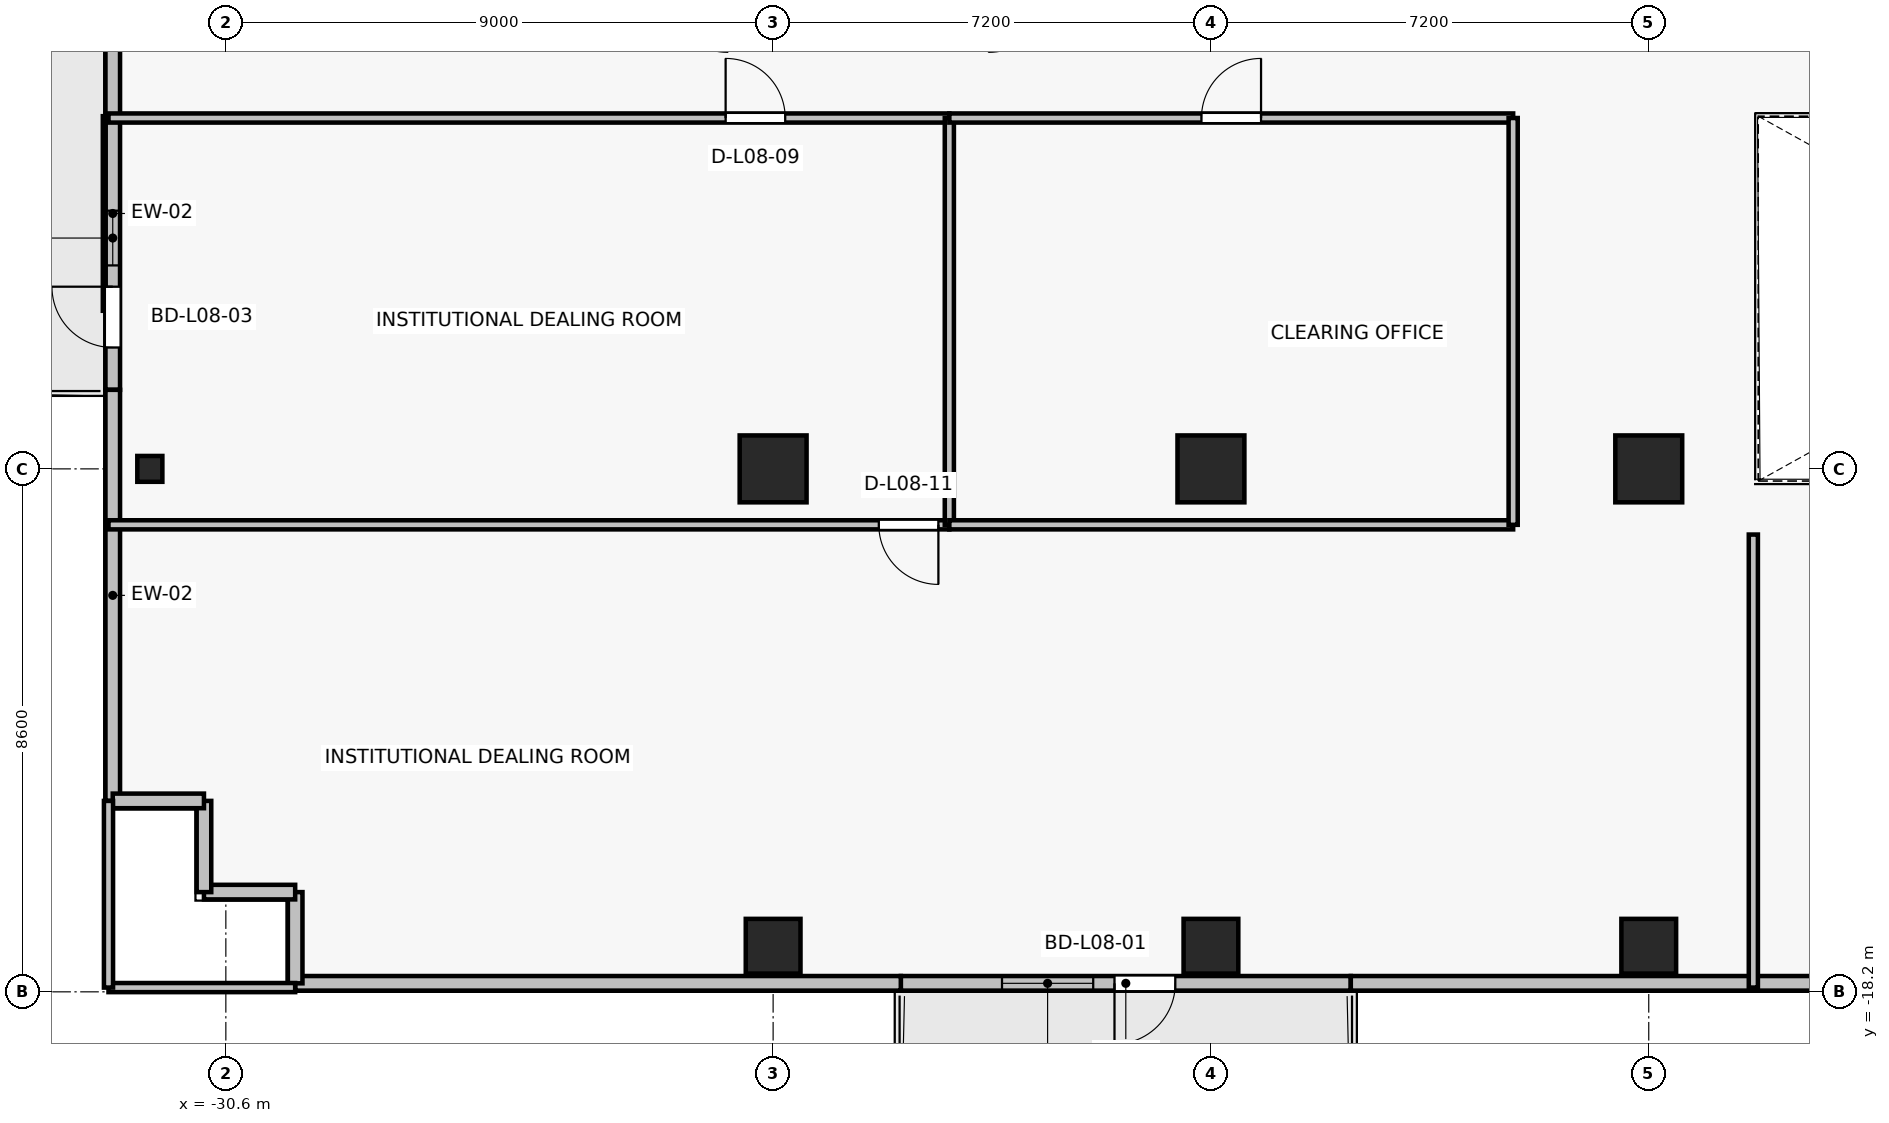
"""IFC4 building model, lengths in metres.
Left out: names, types, materials, properties, quantities, classifications, styles, units other than length and angle.
Written with IfcOpenShell. Run it as: python <this file> out.ifc"""

import sys

from ifc_helpers import new_model, si_unit, direction, frame, frame_2d, origin, origin_2d, place, context, subcontext, project, spatial, rectangle, i_section, extrude, source, transform, mapped, element, fill, save


model = new_model("IFC4")
c1 = context("Model", 3, precision=1e-05, world=origin(), true_north=direction((0.0, 1.0)))
c2 = subcontext(c1, "Body", "Model", "MODEL_VIEW")
j1 = project(units=[si_unit("LENGTHUNIT", "METRE"), si_unit("PLANEANGLEUNIT", "RADIAN")], contexts=[c1])
p1 = place(None, origin())
s1 = spatial("IfcSite", under=j1, at=p1, CompositionType="ELEMENT")
p2 = place(p1, origin())
s2 = spatial("IfcBuilding", under=s1, at=p2, CompositionType="ELEMENT")
p3 = place(p2, frame((0.0, 0.0, 34.0)))
s3 = spatial("IfcBuildingStorey", under=s2, at=p3, CompositionType="ELEMENT", Elevation=34.0)
for number, where, z_axis, x_axis in (
    (1, (-14.4, -9.6, 0.0), (0.0, 0.0, 1.0), (1.0, 0.0, 0.0)),
    (2, (-7.2, -9.6, 0.0), (0.0, 0.0, 1.0), (1.0, 0.0, 0.0)),
    (3, (-21.6, -9.6, 0.0), (0.0, 0.0, 1.0), (1.0, 0.0, 0.0)),
):
    element("IfcColumn", number, at=place(p3, frame(where, z_axis=z_axis, x_axis=x_axis)), inside=s3, PredefinedType="COLUMN", context=c2, shape_type="SweptSolid", body=[
        extrude(rectangle(XDim=1.1, YDim=1.1, at=origin_2d()), origin(), (0.0, 0.0, 1.0), 3.3),
    ])
for number, where, z_axis, x_axis in (
    (4, (-14.4, -17.45, 0.0), (0.0, 0.0, 1.0), (1.0, 0.0, 0.0)),
    (5, (-7.2, -17.45, 0.0), (0.0, 0.0, 1.0), (1.0, 0.0, 0.0)),
    (6, (-21.6, -17.45, 0.0), (0.0, 0.0, 1.0), (1.0, 0.0, 0.0)),
):
    element("IfcColumn", number, at=place(p3, frame(where, z_axis=z_axis, x_axis=x_axis)), inside=s3, PredefinedType="COLUMN", context=c2, shape_type="SweptSolid", body=[
        extrude(rectangle(XDim=0.9, YDim=0.9, at=origin_2d()), origin(), (0.0, 0.0, 1.0), 3.3),
    ])
p4 = place(p3, frame((-31.85, -9.6, 0.0), z_axis=(0.0, 0.0, 1.0), x_axis=(1.0, 0.0, 0.0)))
e7 = element("IfcColumn", 7, at=p4, inside=s3, PredefinedType="COLUMN", context=c2, shape_type="SweptSolid", body=[
    extrude(i_section(OverallWidth=0.412, OverallDepth=0.425, WebThickness=0.026, FlangeThickness=0.039, FilletRadius=0.015, at=origin_2d()), origin(), (0.0, 0.0, 1.0), 3.3),
])
p5 = place(p3, frame((-12.1, -18.06, 0.0), z_axis=(0.0, 0.0, 1.0), x_axis=(-1.0, 0.0, 0.0)))
e8 = element("IfcWall", 8, at=p5, inside=s3, PredefinedType="SOLIDWALL", context=c2, shape_type="SweptSolid", body=[
    extrude(rectangle(XDim=7.4, YDim=0.24, at=frame_2d((3.7, 0.0))), origin(), (0.0, 0.0, 1.0), 2.665),
])
p6 = place(p5, frame((2.886, 0.0, 0.0)))
e9 = element("IfcOpeningElement", 9, at=p6, cuts=e8, PredefinedType="OPENING", context=c2, shape_type="SweptSolid", body=[
    extrude(rectangle(XDim=1.0, YDim=2.2, at=frame_2d((0.5, 1.1))), frame((0.0, 0.13, 0.0), z_axis=(0.0, -1.0, 0.0), x_axis=(1.0, 0.0, 0.0)), (0.0, 0.0, 1.0), 0.26),
])
p7 = place(p5, frame((4.236, 0.0, 0.85)))
e10 = element("IfcOpeningElement", 10, at=p7, cuts=e8, PredefinedType="OPENING", context=c2, shape_type="SweptSolid", body=[
    extrude(rectangle(XDim=1.5, YDim=1.6, at=frame_2d((0.75, 0.8))), frame((0.0, 0.13, 0.0), z_axis=(0.0, -1.0, 0.0), x_axis=(1.0, 0.0, 0.0)), (0.0, 0.0, 1.0), 0.26),
])
p8 = place(p3, frame((-32.46, -8.3, 0.0), z_axis=(0.0, 0.0, 1.0), x_axis=(0.0, 1.0, 0.0)))
e11 = element("IfcWall", 11, at=p8, inside=s3, PredefinedType="SOLIDWALL", context=c2, shape_type="SweptSolid", body=[
    extrude(rectangle(XDim=5.8, YDim=0.24, at=frame_2d((2.9, 0.0))), origin(), (0.0, 0.0, 1.0), 3.075),
])
p9 = place(p8, frame((0.696, 0.0, 0.0)))
e12 = element("IfcOpeningElement", 12, at=p9, cuts=e11, PredefinedType="OPENING", context=c2, shape_type="SweptSolid", body=[
    extrude(rectangle(XDim=1.0, YDim=2.2, at=frame_2d((0.5, 1.1))), frame((0.0, 0.13, 0.0), z_axis=(0.0, -1.0, 0.0), x_axis=(1.0, 0.0, 0.0)), (0.0, 0.0, 1.0), 0.26),
])
p10 = place(p8, frame((2.046, 0.0, 0.85)))
e13 = element("IfcOpeningElement", 13, at=p10, cuts=e11, PredefinedType="OPENING", context=c2, shape_type="SweptSolid", body=[
    extrude(rectangle(XDim=0.9, YDim=1.35, at=frame_2d((0.45, 0.675))), frame((0.0, 0.13, 0.0), z_axis=(0.0, -1.0, 0.0), x_axis=(1.0, 0.0, 0.0)), (0.0, 0.0, 1.0), 0.26),
])
p11 = place(p3, frame((-32.46, -8.3, 0.0), z_axis=(0.0, 0.0, 1.0), x_axis=(0.0, -1.0, 0.0)))
e14 = element("IfcWall", 14, at=p11, inside=s3, PredefinedType="SOLIDWALL", context=c2, shape_type="SweptSolid", body=[
    extrude(rectangle(XDim=6.76, YDim=0.24, at=frame_2d((3.38, 0.0))), origin(), (0.0, 0.0, 1.0), 3.075),
])
p12 = place(p3, frame((-12.1, -18.06, 0.0), z_axis=(0.0, 0.0, 1.0), x_axis=(1.0, 0.0, 0.0)))
e15 = element("IfcWall", 15, at=p12, inside=s3, PredefinedType="SOLIDWALL", context=c2, shape_type="SweptSolid", body=[
    extrude(rectangle(XDim=8.76, YDim=0.24, at=frame_2d((4.38, 0.0))), origin(), (0.0, 0.0, 1.0), 3.075),
])
p13 = place(p3, frame((-29.46, -18.06, 0.0), z_axis=(0.0, 0.0, 1.0), x_axis=(1.0, 0.0, 0.0)))
e16 = element("IfcWall", 16, at=p13, inside=s3, PredefinedType="SOLIDWALL", context=c2, shape_type="SweptSolid", body=[
    extrude(rectangle(XDim=9.96, YDim=0.24, at=frame_2d((4.98, 0.0))), origin(), (0.0, 0.0, 1.0), 2.665),
])
for number, where, z_axis, x_axis in (
    (17, (-29.46, -16.56, 0.0), (0.0, 0.0, 1.0), (0.0, -1.0, 0.0)),
    (18, (-30.96, -16.56, 0.0), (0.0, 0.0, 1.0), (1.0, 0.0, 0.0)),
    (19, (-30.96, -15.06, 0.0), (0.0, 0.0, 1.0), (0.0, -1.0, 0.0)),
    (20, (-32.46, -15.06, 0.0), (0.0, 0.0, 1.0), (1.0, 0.0, 0.0)),
):
    element("IfcWall", number, at=place(p3, frame(where, z_axis=z_axis, x_axis=x_axis)), inside=s3, PredefinedType="SOLIDWALL", context=c2, shape_type="SweptSolid", body=[
        extrude(rectangle(XDim=1.5, YDim=0.24, at=frame_2d((0.75, 0.0))), origin(), (0.0, 0.0, 1.0), 3.075),
    ])
p14 = place(p3, frame((-18.702, -10.52, 0.0), z_axis=(0.0, 0.0, 1.0), x_axis=(-1.0, 0.0, 0.0)))
e21 = element("IfcWall", 21, at=p14, inside=s3, PredefinedType="PARTITIONING", context=c2, shape_type="SweptSolid", body=[
    extrude(rectangle(XDim=13.828, YDim=0.15, at=frame_2d((6.914, 0.0))), origin(), (0.0, 0.0, 1.0), 2.465),
])
p15 = place(p14, frame((0.18, 0.0, 0.0)))
e22 = element("IfcOpeningElement", 22, at=p15, cuts=e21, PredefinedType="OPENING", context=c2, shape_type="SweptSolid", body=[
    extrude(rectangle(XDim=0.98, YDim=2.15, at=frame_2d((0.49, 1.075))), frame((0.0, 0.085, 0.0), z_axis=(0.0, -1.0, 0.0), x_axis=(1.0, 0.0, 0.0)), (0.0, 0.0, 1.0), 0.17),
])
p16 = place(p3, frame((-32.53, -3.83, 0.0), z_axis=(0.0, 0.0, 1.0), x_axis=(1.0, 0.0, 0.0)))
e23 = element("IfcWall", 23, at=p16, inside=s3, PredefinedType="PARTITIONING", context=c2, shape_type="SweptSolid", body=[
    extrude(rectangle(XDim=13.828, YDim=0.15, at=frame_2d((6.914, 0.0))), origin(), (0.0, 0.0, 1.0), 2.465),
])
p17 = place(p16, frame((10.149, 0.0, 0.0)))
e24 = element("IfcOpeningElement", 24, at=p17, cuts=e23, PredefinedType="OPENING", context=c2, shape_type="SweptSolid", body=[
    extrude(rectangle(XDim=0.98, YDim=2.15, at=frame_2d((0.49, 1.075))), frame((0.0, 0.085, 0.0), z_axis=(0.0, -1.0, 0.0), x_axis=(1.0, 0.0, 0.0)), (0.0, 0.0, 1.0), 0.17),
])
p18 = place(p3, frame((-18.702, -3.83, 0.0), z_axis=(0.0, 0.0, 1.0), x_axis=(0.0, -1.0, 0.0)))
e25 = element("IfcWall", 25, at=p18, inside=s3, PredefinedType="PARTITIONING", context=c2, shape_type="SweptSolid", body=[
    extrude(rectangle(XDim=6.69, YDim=0.15, at=frame_2d((3.345, 0.0))), origin(), (0.0, 0.0, 1.0), 2.465),
])
p19 = place(p3, frame((-9.43, -10.52, 0.0), z_axis=(0.0, 0.0, 1.0), x_axis=(-1.0, 0.0, 0.0)))
e26 = element("IfcWall", 26, at=p19, inside=s3, PredefinedType="PARTITIONING", context=c2, shape_type="SweptSolid", body=[
    extrude(rectangle(XDim=9.272, YDim=0.15, at=frame_2d((4.636, 0.0))), origin(), (0.0, 0.0, 1.0), 2.465),
])
p20 = place(p3, frame((-18.702, -3.83, 0.0), z_axis=(0.0, 0.0, 1.0), x_axis=(1.0, 0.0, 0.0)))
e27 = element("IfcWall", 27, at=p20, inside=s3, PredefinedType="PARTITIONING", context=c2, shape_type="SweptSolid", body=[
    extrude(rectangle(XDim=9.272, YDim=0.15, at=frame_2d((4.636, 0.0))), origin(), (0.0, 0.0, 1.0), 2.465),
])
p21 = place(p20, frame((4.146, 0.0, 0.0)))
e28 = element("IfcOpeningElement", 28, at=p21, cuts=e27, PredefinedType="OPENING", context=c2, shape_type="SweptSolid", body=[
    extrude(rectangle(XDim=0.98, YDim=2.15, at=frame_2d((0.49, 1.075))), frame((0.0, 0.085, 0.0), z_axis=(0.0, -1.0, 0.0), x_axis=(1.0, 0.0, 0.0)), (0.0, 0.0, 1.0), 0.17),
])
p22 = place(p3, frame((-9.43, -3.83, 0.0), z_axis=(0.0, 0.0, 1.0), x_axis=(0.0, -1.0, 0.0)))
e29 = element("IfcWall", 29, at=p22, inside=s3, PredefinedType="PARTITIONING", context=c2, shape_type="SweptSolid", body=[
    extrude(rectangle(XDim=6.69, YDim=0.15, at=frame_2d((3.345, 0.0))), origin(), (0.0, 0.0, 1.0), 2.465),
])
p23 = place(p3, frame((-29.46, -18.13, 0.0), z_axis=(0.0, 0.0, 1.0), x_axis=(-1.0, 0.0, 0.0)))
e30 = element("IfcWall", 30, at=p23, inside=s3, PredefinedType="PARTITIONING", context=c2, shape_type="SweptSolid", body=[
    extrude(rectangle(XDim=3.07, YDim=0.15, at=frame_2d((1.535, 0.0))), origin(), (0.0, 0.0, 1.0), 2.665),
])
p24 = place(p3, frame((-32.53, -18.13, 0.0), z_axis=(0.0, 0.0, 1.0), x_axis=(0.0, 1.0, 0.0)))
e31 = element("IfcWall", 31, at=p24, inside=s3, PredefinedType="PARTITIONING", context=c2, shape_type="SweptSolid", body=[
    extrude(rectangle(XDim=3.07, YDim=0.15, at=frame_2d((1.535, 0.0))), origin(), (0.0, 0.0, 1.0), 3.075),
])
p25 = place(p3, frame((-5.48, -10.68, 0.0), z_axis=(0.0, 0.0, 1.0), x_axis=(0.0, -1.0, 0.0)))
e32 = element("IfcWall", 32, at=p25, inside=s3, PredefinedType="PARTITIONING", context=c2, shape_type="SweptSolid", body=[
    extrude(rectangle(XDim=7.45, YDim=0.15, at=frame_2d((3.725, 0.0))), origin(), (0.0, 0.0, 1.0), 2.465),
])
m1 = source(origin(), c2, "Body", "SweptSolid", [
    extrude(rectangle(XDim=1.0, YDim=2.2, at=frame_2d((0.5, 1.1))), frame((0.0, 0.025, 0.0), z_axis=(0.0, -1.0, 0.0), x_axis=(1.0, 0.0, 0.0)), (0.0, 0.0, 1.0), 0.05),
])
p26 = place(p6, origin())
e33 = element("IfcDoor", 33, at=p26, inside=s3, OperationType="SINGLE_SWING_RIGHT", PredefinedType="DOOR", context=c2, shape_type="MappedRepresentation", body=[
    mapped(m1, transform((0.0, 0.0, 0.0), x_axis=(1.0, 0.0, 0.0), y_axis=(0.0, 1.0, 0.0), z_axis=(0.0, 0.0, 1.0), scale=1.0)),
])
fill(e9, e33)
m2 = source(origin(), c2, "Body", "SweptSolid", [
    extrude(rectangle(XDim=1.5, YDim=1.6, at=frame_2d((0.75, 0.8))), frame((0.0, 0.03, 0.0), z_axis=(0.0, -1.0, 0.0), x_axis=(1.0, 0.0, 0.0)), (0.0, 0.0, 1.0), 0.06),
])
p27 = place(p7, origin())
e34 = element("IfcWindow", 34, at=p27, inside=s3, PartitioningType="SINGLE_PANEL", PredefinedType="WINDOW", context=c2, shape_type="MappedRepresentation", body=[
    mapped(m2, transform((0.0, 0.0, 0.0), x_axis=(1.0, 0.0, 0.0), y_axis=(0.0, 1.0, 0.0), z_axis=(0.0, 0.0, 1.0), scale=1.0)),
])
fill(e10, e34)
p28 = place(p9, origin())
e35 = element("IfcDoor", 35, at=p28, inside=s3, OperationType="SINGLE_SWING_RIGHT", PredefinedType="DOOR", context=c2, shape_type="MappedRepresentation", body=[
    mapped(m1, transform((0.0, 0.0, 0.0), x_axis=(1.0, 0.0, 0.0), y_axis=(0.0, 1.0, 0.0), z_axis=(0.0, 0.0, 1.0), scale=1.0)),
])
fill(e12, e35)
m3 = source(origin(), c2, "Body", "SweptSolid", [
    extrude(rectangle(XDim=0.9, YDim=1.35, at=frame_2d((0.45, 0.675))), frame((0.0, 0.03, 0.0), z_axis=(0.0, -1.0, 0.0), x_axis=(1.0, 0.0, 0.0)), (0.0, 0.0, 1.0), 0.06),
])
p29 = place(p10, origin())
e36 = element("IfcWindow", 36, at=p29, inside=s3, PartitioningType="SINGLE_PANEL", PredefinedType="WINDOW", context=c2, shape_type="MappedRepresentation", body=[
    mapped(m3, transform((0.0, 0.0, 0.0), x_axis=(1.0, 0.0, 0.0), y_axis=(0.0, 1.0, 0.0), z_axis=(0.0, 0.0, 1.0), scale=1.0)),
])
fill(e13, e36)
m4 = source(origin(), c2, "Body", "SweptSolid", [
    extrude(rectangle(XDim=0.98, YDim=2.15, at=frame_2d((0.49, 1.075))), frame((0.0, 0.025, 0.0), z_axis=(0.0, -1.0, 0.0), x_axis=(1.0, 0.0, 0.0)), (0.0, 0.0, 1.0), 0.05),
])
p30 = place(p17, origin())
e37 = element("IfcDoor", 37, at=p30, inside=s3, OperationType="SINGLE_SWING_LEFT", PredefinedType="DOOR", context=c2, shape_type="MappedRepresentation", body=[
    mapped(m4, transform((0.0, 0.0, 0.0), x_axis=(1.0, 0.0, 0.0), y_axis=(0.0, 1.0, 0.0), z_axis=(0.0, 0.0, 1.0), scale=1.0)),
])
fill(e24, e37)
p31 = place(p21, origin())
e38 = element("IfcDoor", 38, at=p31, inside=s3, OperationType="SINGLE_SWING_RIGHT", PredefinedType="DOOR", context=c2, shape_type="MappedRepresentation", body=[
    mapped(m4, transform((0.0, 0.0, 0.0), x_axis=(1.0, 0.0, 0.0), y_axis=(0.0, 1.0, 0.0), z_axis=(0.0, 0.0, 1.0), scale=1.0)),
])
fill(e28, e38)
p32 = place(p15, origin())
e39 = element("IfcDoor", 39, at=p32, inside=s3, OperationType="SINGLE_SWING_LEFT", PredefinedType="DOOR", context=c2, shape_type="MappedRepresentation", body=[
    mapped(m4, transform((0.0, 0.0, 0.0), x_axis=(1.0, 0.0, 0.0), y_axis=(0.0, 1.0, 0.0), z_axis=(0.0, 0.0, 1.0), scale=1.0)),
])
fill(e22, e39)
save(model, sys.argv[1])
